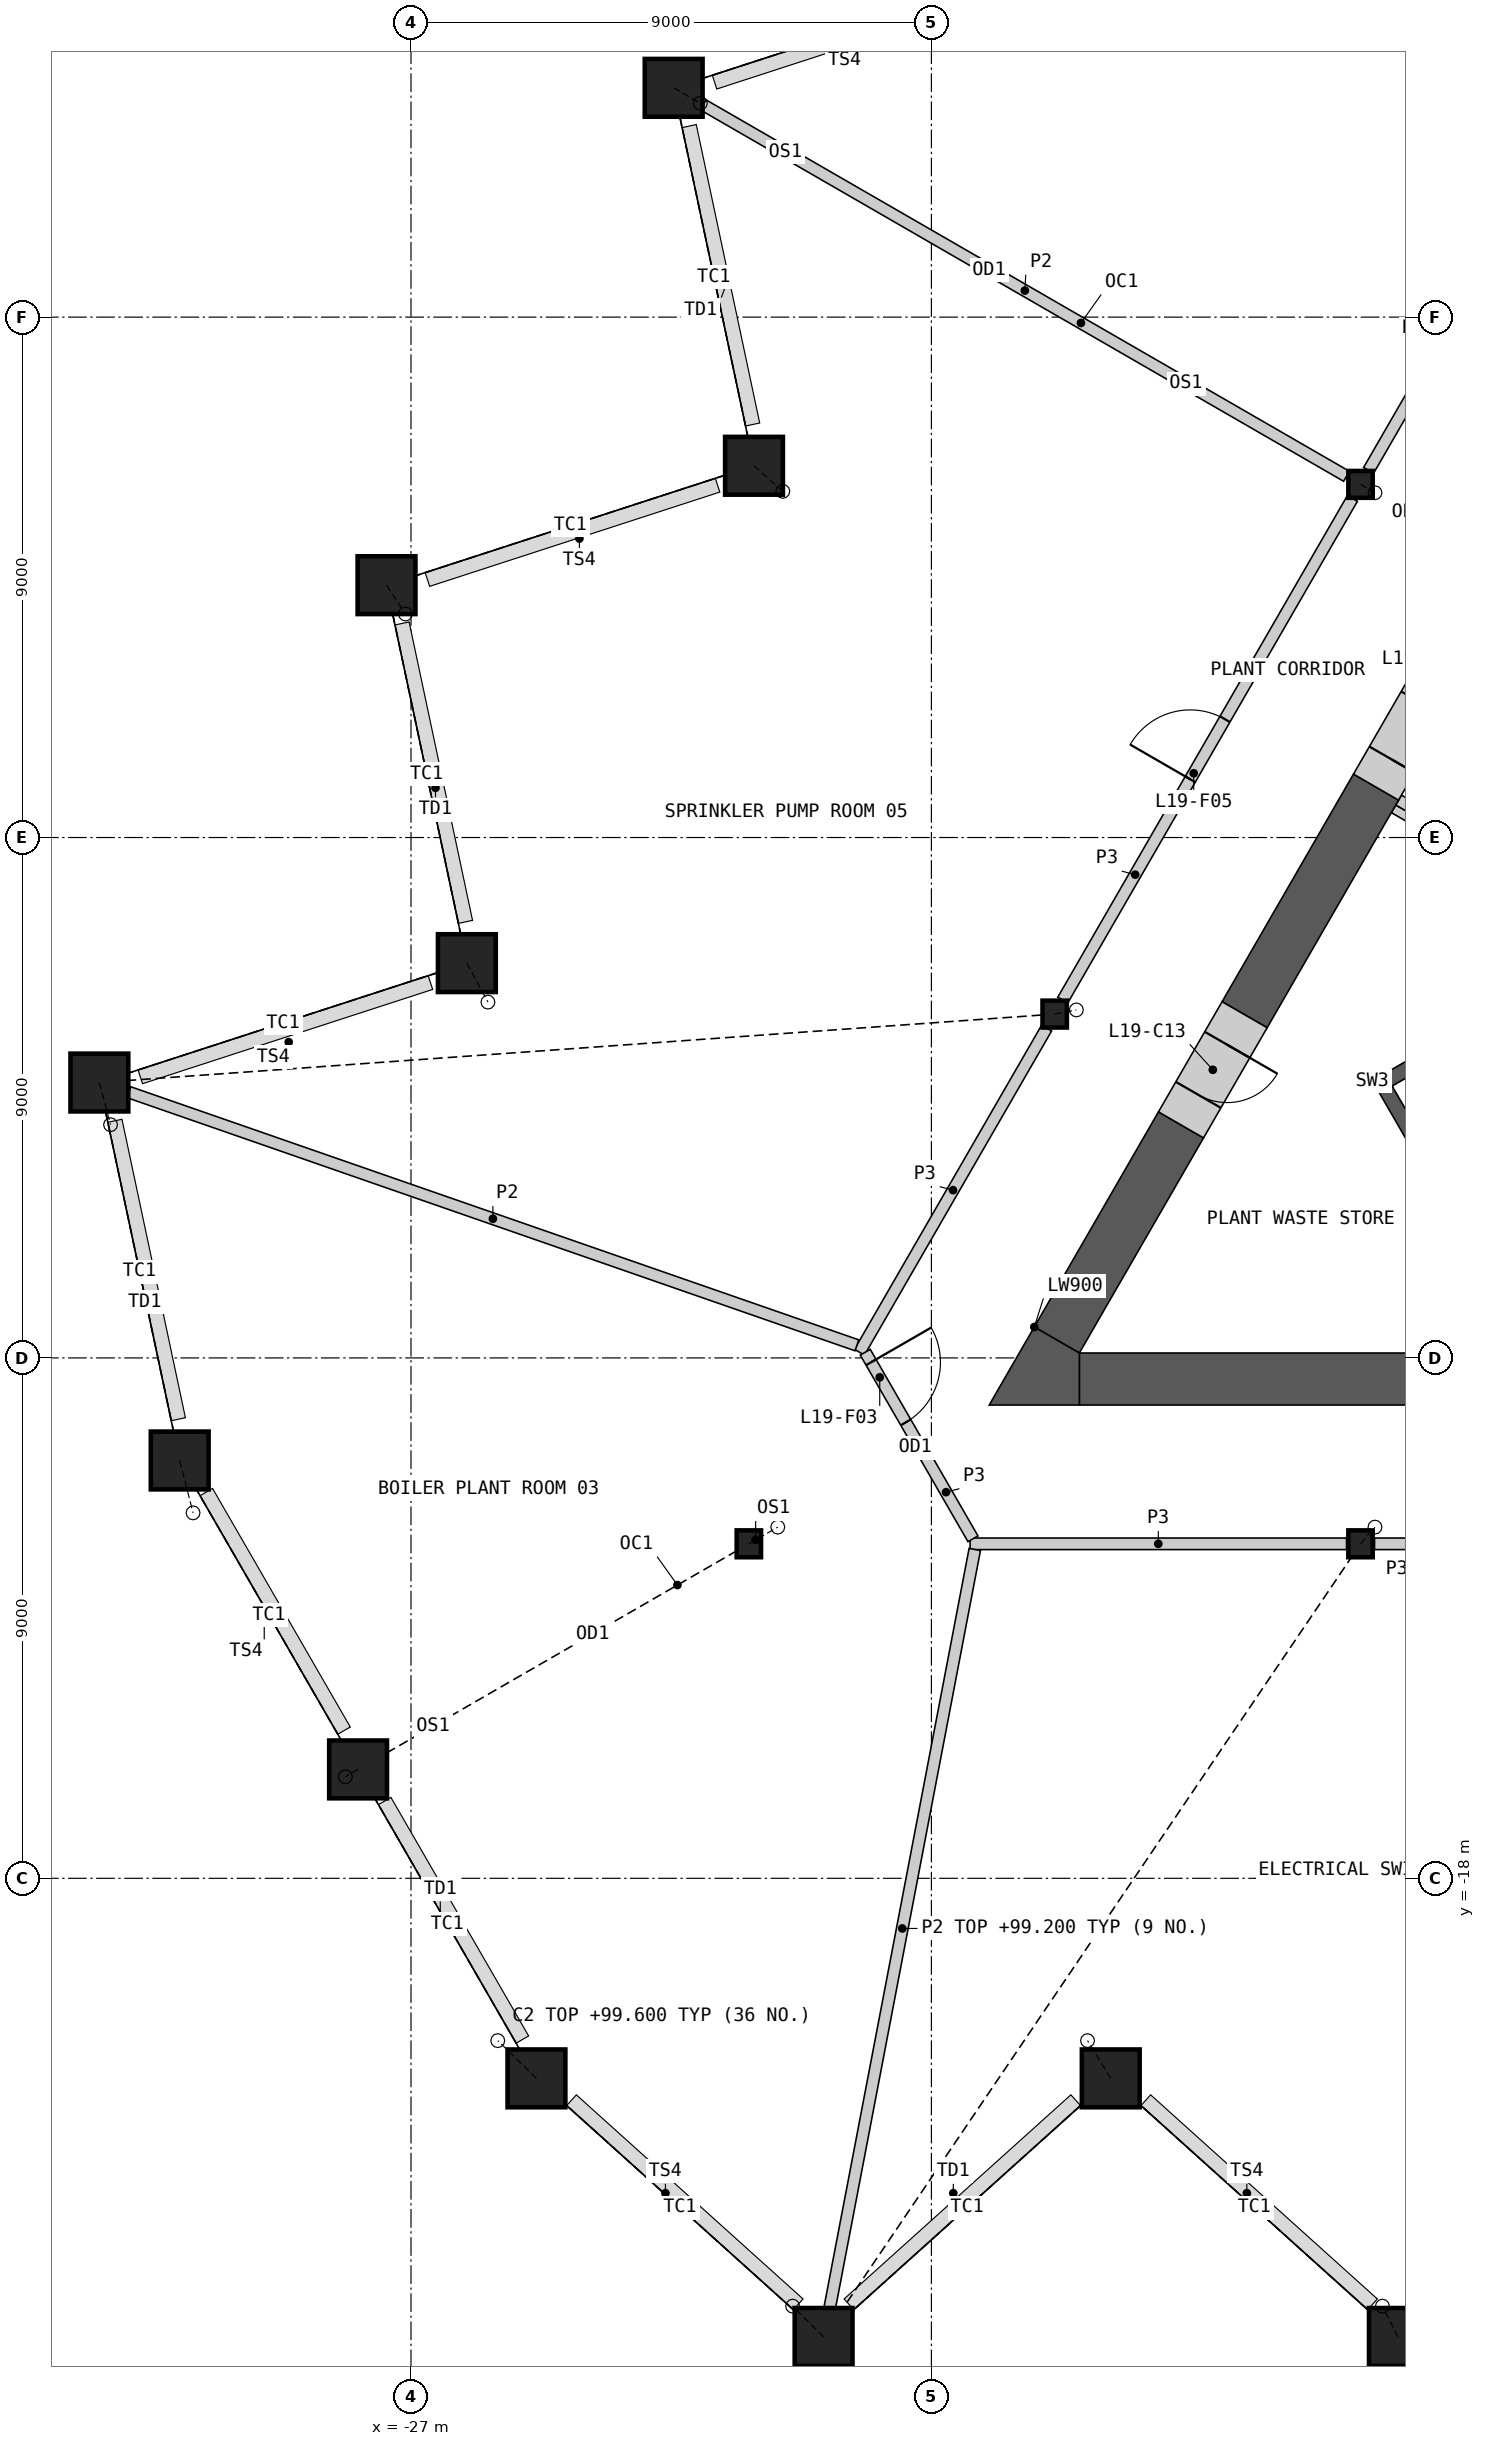
"""IFC4 building model, lengths in metres.
Left out: names, types, materials, properties, quantities, classifications, styles, units other than length and angle.
Written with IfcOpenShell. Run it as: python <this file> out.ifc"""

import sys

from ifc_helpers import new_model, si_unit, direction, frame, frame_2d, origin, origin_2d, place, context, subcontext, project, spatial, polyline, rectangle, hollow_rectangle, i_section, outline, extrude, element, fill, save


model = new_model("IFC4")
c1 = context("Model", 3, precision=1e-05, world=origin(), true_north=direction((0.0, 1.0)))
c2 = subcontext(c1, "Body", "Model", "MODEL_VIEW")
j1 = project(units=[si_unit("LENGTHUNIT", "METRE"), si_unit("PLANEANGLEUNIT", "RADIAN")], contexts=[c1])
p1 = place(None, origin())
s1 = spatial("IfcSite", under=j1, at=p1, CompositionType="ELEMENT")
p2 = place(p1, origin())
s2 = spatial("IfcBuilding", under=s1, at=p2, CompositionType="ELEMENT")
p3 = place(p2, frame((0.0, 0.0, 94.6)))
s3 = spatial("IfcBuildingStorey", under=s2, at=p3, CompositionType="ELEMENT", Elevation=94.6)
p4 = place(p3, frame((-24.83, -21.46, 0.0), z_axis=(-0.131605166119, 0.128341434793, 0.982959081735), x_axis=(-0.698173751627, -0.715928357128, 0.0)))
e1 = element("IfcColumn", 1, at=p4, inside=s3, PredefinedType="COLUMN", context=c2, shape_type="SweptSolid", body=[
    extrude(hollow_rectangle(XDim=1.0, YDim=1.0, WallThickness=0.07, at=origin_2d()), frame((0.0, 0.0, 0.094)), (0.0, 0.0, 1.0), 4.9),
])
p5 = place(p3, frame((-19.864, -25.931, 0.0), z_axis=(-0.105880018908, 0.105252367177, 0.988792880638), x_axis=(-0.705001587737, -0.709205725645, 0.0)))
e2 = element("IfcColumn", 2, at=p5, inside=s3, PredefinedType="COLUMN", context=c2, shape_type="SweptSolid", body=[
    extrude(hollow_rectangle(XDim=1.0, YDim=1.0, WallThickness=0.07, at=origin_2d()), frame((0.0, 0.0, 0.075)), (0.0, 0.0, 1.0), 4.906),
])
p6 = place(p3, frame((-14.898, -21.46, 0.0), z_axis=(-0.07939482303, 0.129058818712, 0.98845348064), x_axis=(-0.851734862895, -0.523973017749, 0.0)))
e3 = element("IfcColumn", 3, at=p6, inside=s3, PredefinedType="COLUMN", context=c2, shape_type="SweptSolid", body=[
    extrude(hollow_rectangle(XDim=1.0, YDim=1.0, WallThickness=0.07, at=origin_2d()), frame((0.0, 0.0, 0.077)), (0.0, 0.0, 1.0), 4.905),
])
p7 = place(p3, frame((-9.932, -25.931, 0.0), z_axis=(-0.053188154863, 0.105697518324, 0.992974851042), x_axis=(-0.893276919367, -0.449506780067, 0.0)))
e4 = element("IfcColumn", 4, at=p7, inside=s3, PredefinedType="COLUMN", context=c2, shape_type="SweptSolid", body=[
    extrude(hollow_rectangle(XDim=1.0, YDim=1.0, WallThickness=0.07, at=origin_2d()), frame((0.0, 0.0, 0.06)), (0.0, 0.0, 1.0), 4.916),
])
p8 = place(p3, frame((-22.457, 12.966, 0.0), z_axis=(0.091669600312, -0.05292365696, 0.994382105085), x_axis=(0.499987164874, 0.866032814021, 0.0)))
e5 = element("IfcColumn", 5, at=p8, inside=s3, PredefinedType="COLUMN", context=c2, shape_type="SweptSolid", body=[
    extrude(hollow_rectangle(XDim=1.0, YDim=1.0, WallThickness=0.07, at=origin_2d()), frame((0.0, 0.0, 0.053)), (0.0, 0.0, 1.0), 4.922),
])
p9 = place(p3, frame((-21.068, 6.429, 0.0), z_axis=(0.098784861039, -0.08770120931, 0.991236626197), x_axis=(0.663908879859, 0.747813478914, 0.0)))
e6 = element("IfcColumn", 6, at=p9, inside=s3, PredefinedType="COLUMN", context=c2, shape_type="SweptSolid", body=[
    extrude(hollow_rectangle(XDim=1.0, YDim=1.0, WallThickness=0.07, at=origin_2d()), frame((0.0, 0.0, 0.067)), (0.0, 0.0, 1.0), 4.911),
])
p10 = place(p3, frame((-27.423, 4.364, 0.0), z_axis=(0.064969927974, -0.098909442588, 0.992973227547), x_axis=(0.835812913886, 0.549014365004, 0.0)))
e7 = element("IfcColumn", 7, at=p10, inside=s3, PredefinedType="COLUMN", context=c2, shape_type="SweptSolid", body=[
    extrude(hollow_rectangle(XDim=1.0, YDim=1.0, WallThickness=0.07, at=origin_2d()), frame((0.0, 0.0, 0.06)), (0.0, 0.0, 1.0), 4.916),
])
p11 = place(p3, frame((-26.034, -2.172, 0.0), z_axis=(0.072058991564, -0.133258456603, 0.988458236588), x_axis=(0.879630861752, 0.475656963635, 0.0)))
e8 = element("IfcColumn", 8, at=p11, inside=s3, PredefinedType="COLUMN", context=c2, shape_type="SweptSolid", body=[
    extrude(hollow_rectangle(XDim=1.0, YDim=1.0, WallThickness=0.07, at=origin_2d()), frame((0.0, 0.0, 0.077)), (0.0, 0.0, 1.0), 4.905),
])
p12 = place(p3, frame((-32.389, -4.237, 0.0), z_axis=(0.038190275992, -0.144311927862, 0.988795009239), x_axis=(0.966721697861, 0.255830332221, 0.0)))
e9 = element("IfcColumn", 9, at=p12, inside=s3, PredefinedType="COLUMN", context=c2, shape_type="SweptSolid", body=[
    extrude(hollow_rectangle(XDim=1.0, YDim=1.0, WallThickness=0.07, at=origin_2d()), frame((0.0, 0.0, 0.075)), (0.0, 0.0, 1.0), 4.906),
])
p13 = place(p3, frame((-31.0, -10.774, 0.0), z_axis=(0.045356102759, -0.178160691472, 0.982955539156), x_axis=(0.9690892303, 0.246710485623, 0.0)))
e10 = element("IfcColumn", 10, at=p13, inside=s3, PredefinedType="COLUMN", context=c2, shape_type="SweptSolid", body=[
    extrude(hollow_rectangle(XDim=1.0, YDim=1.0, WallThickness=0.07, at=origin_2d()), frame((0.0, 0.0, 0.094)), (0.0, 0.0, 1.0), 4.9),
])
p14 = place(p3, frame((-27.915, -16.117, 0.0), z_axis=(-0.04379158743, -0.025260626157, 0.998721281257), x_axis=(0.499666781426, -0.866217702163, 0.0)))
e11 = element("IfcColumn", 11, at=p14, inside=s3, PredefinedType="COLUMN", context=c2, shape_type="SweptSolid", body=[
    extrude(hollow_rectangle(XDim=1.0, YDim=1.0, WallThickness=0.07, at=origin_2d()), frame((0.0, 0.0, 0.025)), (0.0, 0.0, 1.0), 4.956),
])
p15 = place(p3, frame((-10.578, 6.107, 0.0), z_axis=(0.049916888914, -0.028809454442, 0.998337778277), x_axis=(0.499868889286, 0.866101087359, 0.0)))
e12 = element("IfcColumn", 12, at=p15, inside=s3, PredefinedType="COLUMN", context=c2, shape_type="SweptSolid", body=[
    extrude(i_section(OverallWidth=0.421, OverallDepth=0.465, WebThickness=0.045, FlangeThickness=0.072, at=origin_2d()), frame((0.0, 0.0, 0.013)), (0.0, 0.0, 1.0), 4.981),
])
p16 = place(p3, frame((-15.868, -3.054, 0.0), z_axis=(0.074782233985, 0.014362473324, 0.997096453128), x_axis=(-0.188610251533, 0.982052021543, 0.0)))
e13 = element("IfcColumn", 13, at=p16, inside=s3, PredefinedType="COLUMN", context=c2, shape_type="SweptSolid", body=[
    extrude(i_section(OverallWidth=0.421, OverallDepth=0.465, WebThickness=0.045, FlangeThickness=0.072, at=origin_2d()), frame((0.0, 0.0, 0.018)), (0.0, 0.0, 1.0), 4.979),
])
p17 = place(p3, frame((-21.157, -12.215, 0.0), z_axis=(0.099340040995, 0.057333949442, 0.993400409954), x_axis=(-0.499868889286, 0.866101087359, 0.0)))
e14 = element("IfcColumn", 14, at=p17, inside=s3, PredefinedType="COLUMN", context=c2, shape_type="SweptSolid", body=[
    extrude(i_section(OverallWidth=0.421, OverallDepth=0.465, WebThickness=0.045, FlangeThickness=0.072, at=origin_2d()), frame((0.0, 0.0, 0.027)), (0.0, 0.0, 1.0), 4.979),
])
p18 = place(p3, frame((-10.578, -12.215, 0.0), z_axis=(0.049854859349, 0.057547308351, 0.997097186989), x_axis=(-0.755815657913, 0.654784461677, 0.0)))
e15 = element("IfcColumn", 15, at=p18, inside=s3, PredefinedType="COLUMN", context=c2, shape_type="SweptSolid", body=[
    extrude(i_section(OverallWidth=0.421, OverallDepth=0.465, WebThickness=0.045, FlangeThickness=0.072, at=origin_2d()), frame((0.0, 0.0, 0.018)), (0.0, 0.0, 1.0), 4.979),
])
p19 = place(p3, frame((-8.181, -0.357, 0.0), z_axis=(0.0, 0.0, 1.0), x_axis=(-0.866035824272, 0.499981950752, 0.0)))
e16 = element("IfcWall", 16, at=p19, inside=s3, PredefinedType="SHEAR", context=c2, shape_type="SweptSolid", body=[
    extrude(rectangle(XDim=2.009, YDim=0.2, at=frame_2d((1.004, 0.0))), origin(), (0.0, 0.0, 1.0), 4.6),
])
p20 = place(p3, origin())
e17 = element("IfcWall", 17, at=p20, inside=s3, PredefinedType="SHEAR", context=c2, shape_type="SweptSolid", body=[
    extrude(outline(polyline([(-5.307, -1.281), (-10.374, -4.206), (-10.032, -4.298), (-5.182, -1.498), (-5.307, -1.281)])), origin(), (0.0, 0.0, 1.0), 4.6),
])
p21 = place(p3, origin())
e18 = element("IfcWall", 18, at=p21, inside=s3, PredefinedType="SHEAR", context=c2, shape_type="SweptSolid", body=[
    extrude(outline(polyline([(-10.374, -4.206), (-8.83, -6.881), (-8.738, -6.539), (-10.032, -4.298), (-10.374, -4.206)])), origin(), (0.0, 0.0, 1.0), 4.6),
])
p22 = place(p3, frame((-8.268, -0.509, 0.0), z_axis=(0.0, 0.0, 1.0), x_axis=(-0.866035824272, 0.499981950752, 0.0)))
e19 = element("IfcWall", 19, at=p22, inside=s3, PredefinedType="PARTITIONING", context=c2, shape_type="SweptSolid", body=[
    extrude(rectangle(XDim=2.009, YDim=0.15, at=frame_2d((1.004, 0.0))), origin(), (0.0, 0.0, 1.0), 4.6),
])
p23 = place(p3, frame((-15.441, -9.365, 0.0), z_axis=(0.0, 0.0, 1.0), x_axis=(1.0, 0.0, 0.0)))
e20 = element("IfcWall", 20, at=p23, inside=s3, PredefinedType="SHEAR", context=c2, shape_type="SweptSolid", body=[
    extrude(rectangle(XDim=11.692, YDim=0.9, at=frame_2d((5.846, 0.0))), origin(), (0.0, 0.0, 1.0), 4.6),
])
p24 = place(p3, frame((-10.31, 0.872, 0.0), z_axis=(0.0, 0.0, 1.0), x_axis=(-0.499968858743, -0.866043382451, 0.0)))
e21 = element("IfcWall", 21, at=p24, inside=s3, PredefinedType="SHEAR", context=c2, shape_type="SweptSolid", body=[
    extrude(rectangle(XDim=4.546, YDim=0.9, at=frame_2d((2.273, 0.0))), origin(), (0.0, 0.0, 1.0), 4.6),
])
p25 = place(p3, frame((-13.683, -4.97, 0.0), z_axis=(0.0, 0.0, 1.0), x_axis=(-0.499996331799, -0.866027521611, 0.0)))
e22 = element("IfcWall", 22, at=p25, inside=s3, PredefinedType="SHEAR", context=c2, shape_type="SweptSolid", body=[
    extrude(rectangle(XDim=4.295, YDim=0.9, at=frame_2d((2.148, 0.0))), origin(), (0.0, 0.0, 1.0), 4.6),
])
p26 = place(p3, origin())
e23 = element("IfcWall", 23, at=p26, inside=s3, PredefinedType="SHEAR", context=c2, shape_type="SweptSolid", body=[
    extrude(outline(polyline([(-16.221, -8.465), (-15.441, -8.915), (-15.441, -9.815), (-17.0, -9.815), (-16.221, -8.465)])), origin(), (0.0, 0.0, 1.0), 4.6),
])
p27 = place(p3, frame((-12.583, -3.065, 0.0), z_axis=(0.0, 0.0, 1.0), x_axis=(-0.50002983664, -0.866008176907, 0.0)))
e24 = element("IfcWall", 24, at=p27, inside=s3, PredefinedType="SHEAR", context=c2, shape_type="SweptSolid", body=[
    extrude(rectangle(XDim=2.2, YDim=0.9, at=frame_2d((1.1, 0.0))), origin(), (0.0, 0.0, 1.0), 4.6),
])
p28 = place(p27, frame((0.6, 0.0, 0.0)))
e25 = element("IfcOpeningElement", 25, at=p28, cuts=e24, PredefinedType="OPENING", context=c2, shape_type="SweptSolid", body=[
    extrude(rectangle(XDim=1.0, YDim=2.1, at=frame_2d((0.5, 1.05))), frame((0.0, 0.46, 0.0), z_axis=(0.0, -1.0, 0.0), x_axis=(1.0, 0.0, 0.0)), (0.0, 0.0, 1.0), 0.92),
])
p29 = place(p3, frame((-9.21, 2.777, 0.0), z_axis=(0.0, 0.0, 1.0), x_axis=(-0.500077893725, -0.86598042715, 0.0)))
e26 = element("IfcWall", 26, at=p29, inside=s3, PredefinedType="SHEAR", context=c2, shape_type="SweptSolid", body=[
    extrude(rectangle(XDim=2.2, YDim=0.9, at=frame_2d((1.1, 0.0))), origin(), (0.0, 0.0, 1.0), 4.6),
])
p30 = place(p29, frame((0.55, 0.0, 0.0)))
e27 = element("IfcOpeningElement", 27, at=p30, cuts=e26, PredefinedType="OPENING", context=c2, shape_type="SweptSolid", body=[
    extrude(rectangle(XDim=1.1, YDim=2.1, at=frame_2d((0.55, 1.05))), frame((0.0, 0.46, 0.0), z_axis=(0.0, -1.0, 0.0), x_axis=(1.0, 0.0, 0.0)), (0.0, 0.0, 1.0), 0.92),
])
p31 = place(p3, frame((-10.336, -12.215, 0.0), z_axis=(0.0, 0.0, 1.0), x_axis=(1.0, 0.0, 0.0)))
e28 = element("IfcWall", 28, at=p31, inside=s3, PredefinedType="PARTITIONING", context=c2, shape_type="SweptSolid", body=[
    extrude(rectangle(XDim=10.094, YDim=0.2, at=frame_2d((5.047, 0.0))), origin(), (0.0, 0.0, 1.0), 4.6),
])
p32 = place(p31, frame((4.447, 0.0, 0.0)))
e29 = element("IfcOpeningElement", 29, at=p32, cuts=e28, PredefinedType="OPENING", context=c2, shape_type="SweptSolid", body=[
    extrude(rectangle(XDim=1.2, YDim=2.1, at=frame_2d((0.6, 1.05))), frame((0.0, 0.11, 0.0), z_axis=(0.0, -1.0, 0.0), x_axis=(1.0, 0.0, 0.0)), (0.0, 0.0, 1.0), 0.22),
])
p33 = place(p3, frame((-10.439, 6.35, 0.0), z_axis=(0.0, 0.0, 1.0), x_axis=(0.50001002959, 0.86601961312, 0.0)))
e30 = element("IfcWall", 30, at=p33, inside=s3, PredefinedType="PARTITIONING", context=c2, shape_type="SweptSolid", body=[
    extrude(rectangle(XDim=10.019, YDim=0.2, at=frame_2d((5.009, 0.0))), origin(), (0.0, 0.0, 1.0), 4.6),
])
p34 = place(p33, frame((4.409, 0.0, 0.0)))
e31 = element("IfcOpeningElement", 31, at=p34, cuts=e30, PredefinedType="OPENING", context=c2, shape_type="SweptSolid", body=[
    extrude(rectangle(XDim=1.2, YDim=2.1, at=frame_2d((0.6, 1.05))), frame((0.0, 0.11, 0.0), z_axis=(0.0, -1.0, 0.0), x_axis=(1.0, 0.0, 0.0)), (0.0, 0.0, 1.0), 0.22),
])
p35 = place(p3, frame((-15.728, -2.811, 0.0), z_axis=(0.0, 0.0, 1.0), x_axis=(0.49999175339, 0.866030164915, 0.0)))
e32 = element("IfcWall", 32, at=p35, inside=s3, PredefinedType="PARTITIONING", context=c2, shape_type="SweptSolid", body=[
    extrude(rectangle(XDim=10.019, YDim=0.2, at=frame_2d((5.009, 0.0))), origin(), (0.0, 0.0, 1.0), 4.6),
])
p36 = place(p35, frame((4.409, 0.0, 0.0)))
e33 = element("IfcOpeningElement", 33, at=p36, cuts=e32, PredefinedType="OPENING", context=c2, shape_type="SweptSolid", body=[
    extrude(rectangle(XDim=1.2, YDim=2.1, at=frame_2d((0.6, 1.05))), frame((0.0, 0.11, 0.0), z_axis=(0.0, -1.0, 0.0), x_axis=(1.0, 0.0, 0.0)), (0.0, 0.0, 1.0), 0.22),
])
p37 = place(p3, frame((-17.331, -12.215, 0.0), z_axis=(0.0, 0.0, 1.0), x_axis=(1.0, 0.0, 0.0)))
e34 = element("IfcWall", 34, at=p37, inside=s3, PredefinedType="PARTITIONING", context=c2, shape_type="SweptSolid", body=[
    extrude(rectangle(XDim=6.51, YDim=0.2, at=frame_2d((3.255, 0.0))), origin(), (0.0, 0.0, 1.0), 4.6),
])
p38 = place(p3, frame((-19.244, -8.902, 0.0), z_axis=(0.0, 0.0, 1.0), x_axis=(0.499984737558, 0.86603421538, 0.0)))
e35 = element("IfcWall", 35, at=p38, inside=s3, PredefinedType="PARTITIONING", context=c2, shape_type="SweptSolid", body=[
    extrude(rectangle(XDim=6.473, YDim=0.2, at=frame_2d((3.236, 0.0))), origin(), (0.0, 0.0, 1.0), 4.6),
])
p39 = place(p3, frame((-19.144, -8.902, 0.0), z_axis=(0.0, 0.0, 1.0), x_axis=(0.499958791762, -0.866049194065, 0.0)))
e36 = element("IfcWall", 36, at=p39, inside=s3, PredefinedType="PARTITIONING", context=c2, shape_type="SweptSolid", body=[
    extrude(rectangle(XDim=3.726, YDim=0.2, at=frame_2d((1.863, 0.0))), origin(), (0.0, 0.0, 1.0), 4.6),
])
p40 = place(p39, frame((0.201, 0.0, 0.0)))
e37 = element("IfcOpeningElement", 37, at=p40, cuts=e36, PredefinedType="OPENING", context=c2, shape_type="SweptSolid", body=[
    extrude(rectangle(XDim=1.2, YDim=2.1, at=frame_2d((0.6, 1.05))), frame((0.0, 0.11, 0.0), z_axis=(0.0, -1.0, 0.0), x_axis=(1.0, 0.0, 0.0)), (0.0, 0.0, 1.0), 0.22),
])
p41 = place(p3, frame((-19.757, -25.421, 0.0), z_axis=(0.0, 0.0, 1.0), x_axis=(0.187873651286, 0.982193204595, 0.0)))
e38 = element("IfcWall", 38, at=p41, inside=s3, PredefinedType="PARTITIONING", context=c2, shape_type="SweptSolid", body=[
    extrude(rectangle(XDim=13.346, YDim=0.2, at=frame_2d((6.673, 0.0))), origin(), (0.0, 0.0, 1.0), 4.6),
])
p42 = place(p3, frame((-31.879, -4.405, 0.0), z_axis=(0.0, 0.0, 1.0), x_axis=(0.944544719933, -0.328382813263, 0.0)))
e39 = element("IfcWall", 39, at=p42, inside=s3, PredefinedType="PARTITIONING", context=c2, shape_type="SweptSolid", body=[
    extrude(rectangle(XDim=13.33, YDim=0.2, at=frame_2d((6.665, 0.0))), origin(), (0.0, 0.0, 1.0), 4.6),
])
p43 = place(p3, frame((-21.947, 12.671, 0.0), z_axis=(0.0, 0.0, 1.0), x_axis=(0.866026729935, -0.499997703033, 0.0)))
e40 = element("IfcWall", 40, at=p43, inside=s3, PredefinedType="PARTITIONING", context=c2, shape_type="SweptSolid", body=[
    extrude(rectangle(XDim=12.848, YDim=0.2, at=frame_2d((6.424, 0.0))), origin(), (0.0, 0.0, 1.0), 4.6),
])
p44 = place(p28, origin())
e41 = element("IfcDoor", 41, at=p44, inside=s3, OperationType="SINGLE_SWING_LEFT", PredefinedType="DOOR", context=c2, shape_type="SweptSolid", body=[
    extrude(rectangle(XDim=1.0, YDim=2.1, at=frame_2d((0.5, 1.05))), frame((0.0, 0.205, 0.0), z_axis=(0.0, -1.0, 0.0), x_axis=(1.0, 0.0, 0.0)), (0.0, 0.0, 1.0), 0.05),
])
fill(e25, e41)
p45 = place(p30, origin())
e42 = element("IfcDoor", 42, at=p45, inside=s3, OperationType="SINGLE_SWING_RIGHT", PredefinedType="DOOR", context=c2, shape_type="SweptSolid", body=[
    extrude(rectangle(XDim=1.1, YDim=2.1, at=frame_2d((0.55, 1.05))), frame((0.0, 0.205, 0.0), z_axis=(0.0, -1.0, 0.0), x_axis=(1.0, 0.0, 0.0)), (0.0, 0.0, 1.0), 0.05),
])
fill(e27, e42)
p46 = place(p40, origin())
e43 = element("IfcDoor", 43, at=p46, inside=s3, OperationType="SINGLE_SWING_LEFT", PredefinedType="DOOR", context=c2, shape_type="SweptSolid", body=[
    extrude(rectangle(XDim=1.2, YDim=2.1, at=frame_2d((0.6, 1.05))), frame((0.0, 0.025, 0.0), z_axis=(0.0, -1.0, 0.0), x_axis=(1.0, 0.0, 0.0)), (0.0, 0.0, 1.0), 0.05),
])
fill(e37, e43)
p47 = place(p36, origin())
e44 = element("IfcDoor", 44, at=p47, inside=s3, OperationType="SINGLE_SWING_LEFT", PredefinedType="DOOR", context=c2, shape_type="SweptSolid", body=[
    extrude(rectangle(XDim=1.2, YDim=2.1, at=frame_2d((0.6, 1.05))), frame((0.0, 0.025, 0.0), z_axis=(0.0, -1.0, 0.0), x_axis=(1.0, 0.0, 0.0)), (0.0, 0.0, 1.0), 0.05),
])
fill(e33, e44)
save(model, sys.argv[1])
